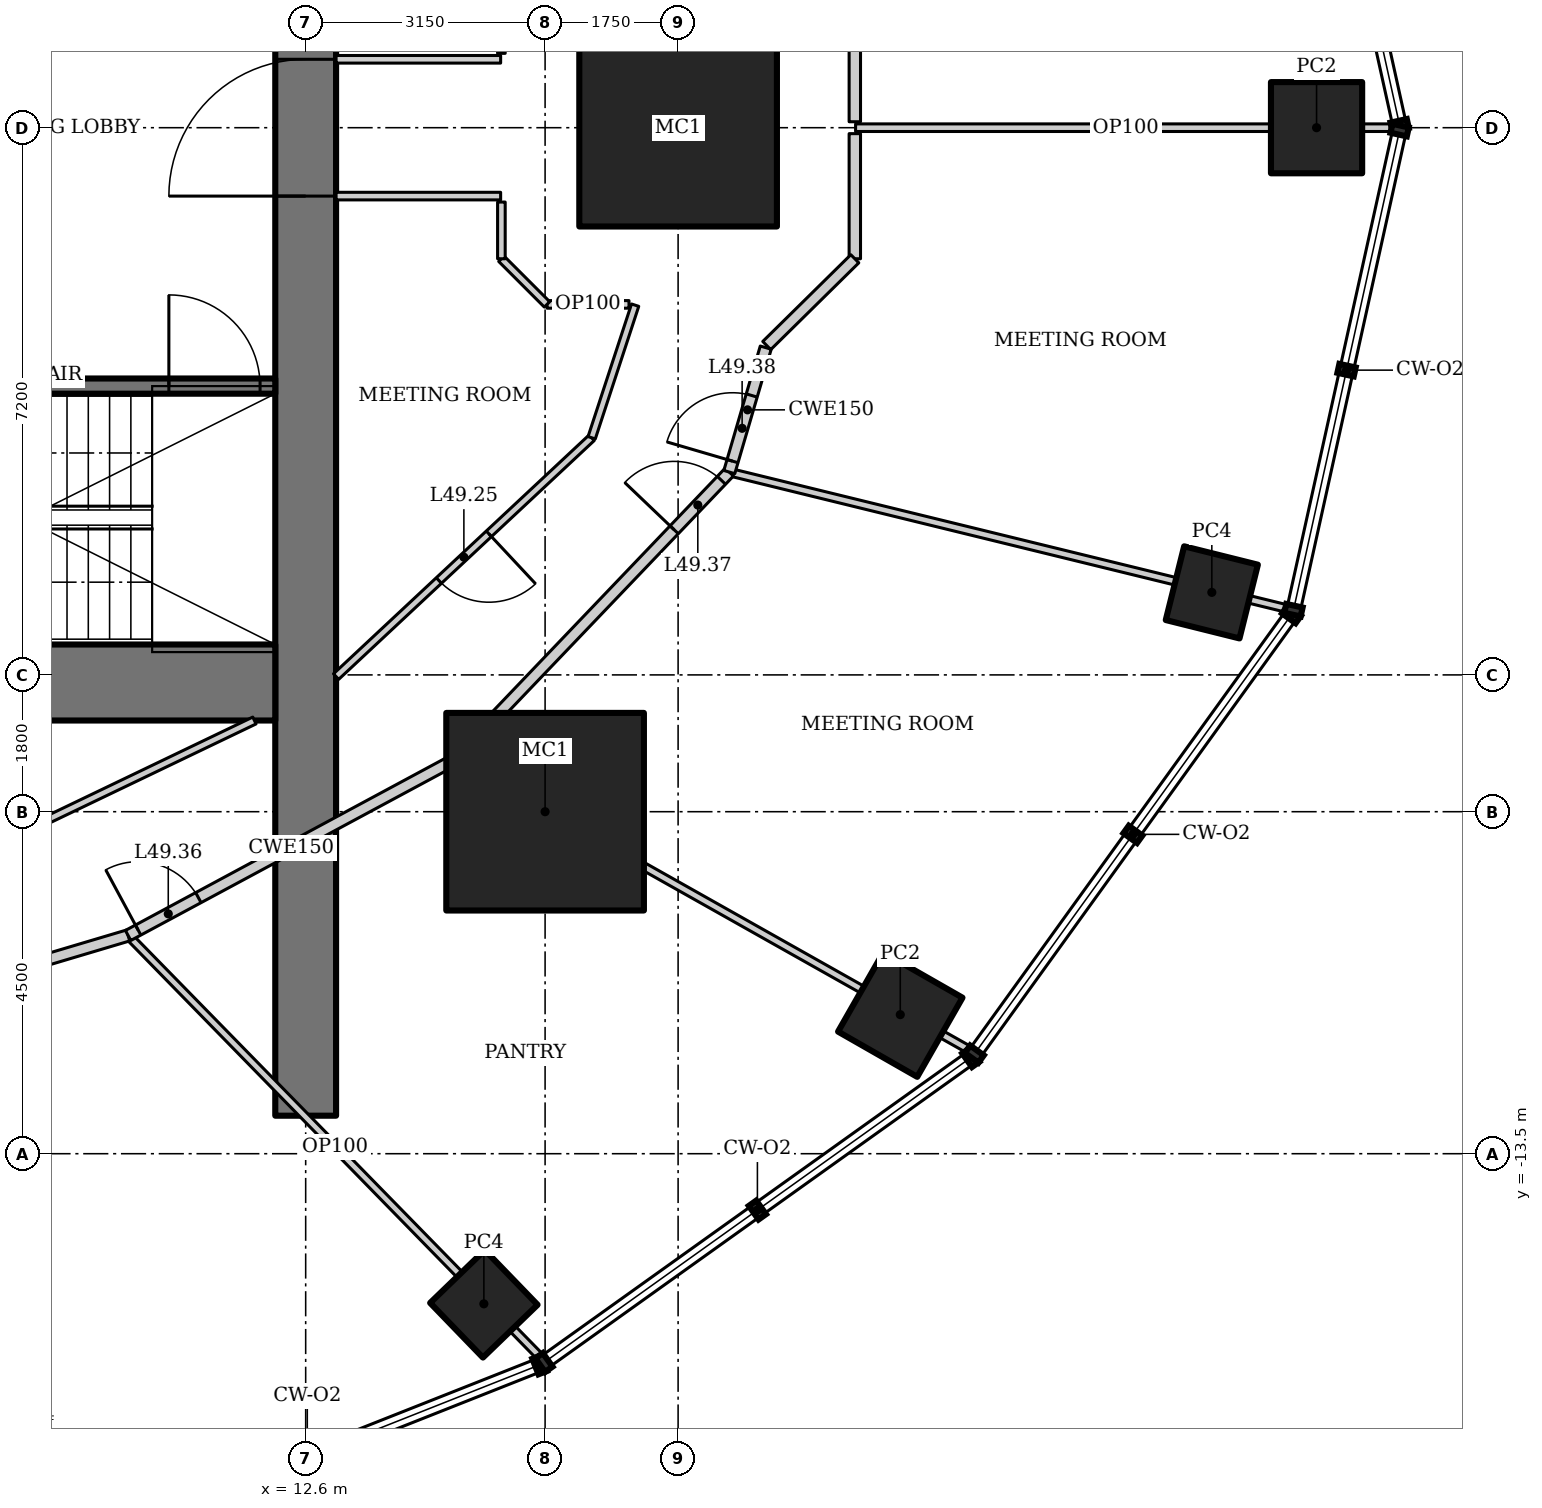
"""IFC4 building model, lengths in metres.
Left out: names, types, materials, properties, quantities, classifications, styles, units other than length and angle.
Written with IfcOpenShell. Run it as: python <this file> out.ifc"""

import sys

from ifc_helpers import new_model, si_unit, direction, frame, frame_2d, origin, origin_2d, place, context, subcontext, project, spatial, rectangle, hollow_rectangle, extrude, element, fill, save


model = new_model("IFC4")
c1 = context("Model", 3, precision=1e-05, world=origin(), true_north=direction((0.0, 1.0)))
c2 = subcontext(c1, "Body", "Model", "MODEL_VIEW")
j1 = project(units=[si_unit("LENGTHUNIT", "METRE"), si_unit("PLANEANGLEUNIT", "RADIAN")], contexts=[c1])
p1 = place(None, origin())
s1 = spatial("IfcSite", under=j1, at=p1, CompositionType="ELEMENT")
p2 = place(p1, origin())
s2 = spatial("IfcBuilding", under=s1, at=p2, CompositionType="ELEMENT")
p3 = place(p2, frame((0.0, 0.0, 211.6)))
s3 = spatial("IfcBuildingStorey", under=s2, at=p3, CompositionType="ELEMENT", Elevation=211.6)
for number, where, z_axis, x_axis in (
    (1, (17.5, 0.0, 0.0), (0.0, 0.0, 1.0), (1.0, 0.0, 0.0)),
    (2, (15.75, -9.0, 0.0), (0.0, 0.0, 1.0), (1.0, 0.0, 0.0)),
):
    element("IfcColumn", number, at=place(p3, frame(where, z_axis=z_axis, x_axis=x_axis)), inside=s3, PredefinedType="COLUMN", context=c2, shape_type="SweptSolid", body=[
        extrude(hollow_rectangle(XDim=2.6, YDim=2.6, WallThickness=0.13, at=origin_2d()), origin(), (0.0, 0.0, 1.0), 4.2),
    ])
p4 = place(p3, frame((25.9, 0.0, 0.0), z_axis=(0.0, 0.0, 1.0), x_axis=(1.0, 0.0, 0.0)))
e3 = element("IfcColumn", 3, at=p4, inside=s3, PredefinedType="COLUMN", context=c2, shape_type="SweptSolid", body=[
    extrude(hollow_rectangle(XDim=1.2, YDim=1.2, WallThickness=0.1, at=origin_2d()), origin(), (0.0, 0.0, 1.0), 4.2),
])
for number, where, z_axis, x_axis in (
    (4, (9.035, -17.731, 0.0), (0.0, 0.0, 1.0), (0.891, 0.454, 0.0)),
    (5, (14.944, -15.475, 0.0), (0.0, 0.0, 1.0), (0.719, 0.695, 0.0)),
):
    element("IfcColumn", number, at=place(p3, frame(where, z_axis=z_axis, x_axis=x_axis)), inside=s3, PredefinedType="COLUMN", context=c2, shape_type="SweptSolid", body=[
        extrude(hollow_rectangle(XDim=1.0, YDim=1.0, WallThickness=0.08, at=origin_2d()), origin(), (0.0, 0.0, 1.0), 4.2),
    ])
p5 = place(p3, frame((20.423, -11.67, 0.0), z_axis=(0.0, 0.0, 1.0), x_axis=(0.496139221777, 0.86824298017, 0.0)))
e6 = element("IfcColumn", 6, at=p5, inside=s3, PredefinedType="COLUMN", context=c2, shape_type="SweptSolid", body=[
    extrude(hollow_rectangle(XDim=1.2, YDim=1.2, WallThickness=0.1, at=origin_2d()), origin(), (0.0, 0.0, 1.0), 4.2),
])
p6 = place(p3, frame((24.522, -6.114, 0.0), z_axis=(0.0, 0.0, 1.0), x_axis=(0.2419218956, 0.970295726276, 0.0)))
e7 = element("IfcColumn", 7, at=p6, inside=s3, PredefinedType="COLUMN", context=c2, shape_type="SweptSolid", body=[
    extrude(hollow_rectangle(XDim=1.0, YDim=1.0, WallThickness=0.08, at=origin_2d()), origin(), (0.0, 0.0, 1.0), 4.2),
])
p7 = place(p3, frame((12.6, -13.0, 0.0), z_axis=(0.0, 0.0, 1.0), x_axis=(0.0, 1.0, 0.0)))
e8 = element("IfcWall", 8, at=p7, inside=s3, PredefinedType="SHEAR", context=c2, shape_type="SweptSolid", body=[
    extrude(rectangle(XDim=26.0, YDim=0.8, at=frame_2d((13.0, 0.0))), origin(), (0.0, 0.0, 1.0), 4.2),
])
p8 = place(p7, frame((12.1, 0.0, 0.0)))
e9 = element("IfcOpeningElement", 9, at=p8, cuts=e8, PredefinedType="OPENING", context=c2, shape_type="SweptSolid", body=[
    extrude(rectangle(XDim=1.8, YDim=2.1, at=frame_2d((0.9, 1.05))), frame((0.0, 0.41, 0.0), z_axis=(0.0, -1.0, 0.0), x_axis=(1.0, 0.0, 0.0)), (0.0, 0.0, 1.0), 0.82),
])
p9 = place(p3, frame((-12.2, -7.3, 0.0), z_axis=(0.0, 0.0, 1.0), x_axis=(1.0, 0.0, 0.0)))
e10 = element("IfcWall", 10, at=p9, inside=s3, PredefinedType="SHEAR", context=c2, shape_type="SweptSolid", body=[
    extrude(rectangle(XDim=24.4, YDim=1.0, at=frame_2d((12.2, 0.0))), origin(), (0.0, 0.0, 1.0), 4.2),
])
p10 = place(p3, frame((5.6, -3.4, 0.0), z_axis=(0.0, 0.0, 1.0), x_axis=(1.0, 0.0, 0.0)))
e11 = element("IfcWall", 11, at=p10, inside=s3, PredefinedType="SHEAR", context=c2, shape_type="SweptSolid", body=[
    extrude(rectangle(XDim=6.6, YDim=0.2, at=frame_2d((3.3, 0.0))), origin(), (0.0, 0.0, 1.0), 4.2),
])
p11 = place(p10, frame((5.2, 0.0, 0.0)))
e12 = element("IfcOpeningElement", 12, at=p11, cuts=e11, PredefinedType="OPENING", context=c2, shape_type="SweptSolid", body=[
    extrude(rectangle(XDim=1.2, YDim=2.1, at=frame_2d((0.6, 1.05))), frame((0.0, 0.11, 0.0), z_axis=(0.0, -1.0, 0.0), x_axis=(1.0, 0.0, 0.0)), (0.0, 0.0, 1.0), 0.22),
])
p12 = place(p3, frame((15.709, -16.199, 0.0), z_axis=(0.0, 0.0, 1.0), x_axis=(-0.699053895446, 0.715068983569, 0.0)))
e13 = element("IfcWall", 13, at=p12, inside=s3, PredefinedType="PARTITIONING", context=c2, shape_type="SweptSolid", body=[
    extrude(rectangle(XDim=7.79, YDim=0.1, at=frame_2d((3.895, 0.0))), origin(), (0.0, 0.0, 1.0), 3.41),
])
p13 = place(p3, frame((21.358, -12.15, 0.0), z_axis=(0.0, 0.0, 1.0), x_axis=(-0.871273053995, 0.490798599614, 0.0)))
e14 = element("IfcWall", 14, at=p13, inside=s3, PredefinedType="PARTITIONING", context=c2, shape_type="SweptSolid", body=[
    extrude(rectangle(XDim=7.807, YDim=0.1, at=frame_2d((3.904, 0.0))), origin(), (0.0, 0.0, 1.0), 3.521),
])
p14 = place(p3, frame((25.543, -6.336, 0.0), z_axis=(0.0, 0.0, 1.0), x_axis=(-0.97130474594, 0.237838370569, 0.0)))
e15 = element("IfcWall", 15, at=p14, inside=s3, PredefinedType="PARTITIONING", context=c2, shape_type="SweptSolid", body=[
    extrude(rectangle(XDim=7.587, YDim=0.1, at=frame_2d((3.793, 0.0))), origin(), (0.0, 0.0, 1.0), 3.108),
])
p15 = place(p3, frame((6.054, -11.882, 0.0), z_axis=(0.0, 0.0, 1.0), x_axis=(0.958384389306, 0.285480931648, 0.0)))
e16 = element("IfcWall", 16, at=p15, inside=s3, PredefinedType="PARTITIONING", context=c2, shape_type="SweptSolid", body=[
    extrude(rectangle(XDim=4.392, YDim=0.15, at=frame_2d((2.196, 0.0))), origin(), (0.0, 0.0, 1.0), 4.05),
])
p16 = place(p3, frame((10.264, -10.628, 0.0), z_axis=(0.0, 0.0, 1.0), x_axis=(0.88053863253, 0.47397438393, 0.0)))
e17 = element("IfcWall", 17, at=p16, inside=s3, PredefinedType="PARTITIONING", context=c2, shape_type="SweptSolid", body=[
    extrude(rectangle(XDim=4.875, YDim=0.15, at=frame_2d((2.438, 0.0))), origin(), (0.0, 0.0, 1.0), 4.05),
])
p17 = place(p16, frame((0.15, 0.0, 0.0)))
e18 = element("IfcOpeningElement", 18, at=p17, cuts=e17, PredefinedType="OPENING", context=c2, shape_type="SweptSolid", body=[
    extrude(rectangle(XDim=0.9, YDim=2.1, at=frame_2d((0.45, 1.05))), frame((0.0, 0.085, 0.0), z_axis=(0.0, -1.0, 0.0), x_axis=(1.0, 0.0, 0.0)), (0.0, 0.0, 1.0), 0.17),
])
p18 = place(p3, frame((14.556, -8.318, 0.0), z_axis=(0.0, 0.0, 1.0), x_axis=(0.690768413292, 0.723076067366, 0.0)))
e19 = element("IfcWall", 19, at=p18, inside=s3, PredefinedType="PARTITIONING", context=c2, shape_type="SweptSolid", body=[
    extrude(rectangle(XDim=5.237, YDim=0.15, at=frame_2d((2.618, 0.0))), origin(), (0.0, 0.0, 1.0), 4.05),
])
p19 = place(p18, frame((4.187, 0.0, 0.0)))
e20 = element("IfcOpeningElement", 20, at=p19, cuts=e19, PredefinedType="OPENING", context=c2, shape_type="SweptSolid", body=[
    extrude(rectangle(XDim=0.9, YDim=2.1, at=frame_2d((0.45, 1.05))), frame((0.0, 0.085, 0.0), z_axis=(0.0, -1.0, 0.0), x_axis=(1.0, 0.0, 0.0)), (0.0, 0.0, 1.0), 0.17),
])
p20 = place(p3, frame((11.926, -7.8, 0.0), z_axis=(0.0, 0.0, 1.0), x_axis=(-0.901553947207, -0.432666708073, 0.0)))
e21 = element("IfcWall", 21, at=p20, inside=s3, PredefinedType="PARTITIONING", context=c2, shape_type="SweptSolid", body=[
    extrude(rectangle(XDim=3.33, YDim=0.1, at=frame_2d((1.665, 0.0))), origin(), (0.0, 0.0, 1.0), 4.05),
])
p21 = place(p3, frame((16.363, -4.08, 0.0), z_axis=(0.0, 0.0, 1.0), x_axis=(-0.730651186567, -0.682750938167, 0.0)))
e22 = element("IfcWall", 22, at=p21, inside=s3, PredefinedType="PARTITIONING", context=c2, shape_type="SweptSolid", body=[
    extrude(rectangle(XDim=4.603, YDim=0.1, at=frame_2d((2.301, 0.0))), origin(), (0.0, 0.0, 1.0), 4.05),
])
p22 = place(p21, frame((1.851, 0.0, 0.0)))
e23 = element("IfcOpeningElement", 23, at=p22, cuts=e22, PredefinedType="OPENING", context=c2, shape_type="SweptSolid", body=[
    extrude(rectangle(XDim=0.9, YDim=2.1, at=frame_2d((0.45, 1.05))), frame((0.0, 0.06, 0.0), z_axis=(0.0, -1.0, 0.0), x_axis=(1.0, 0.0, 0.0)), (0.0, 0.0, 1.0), 0.12),
])
p23 = place(p3, frame((26.944, 0.0, 0.0), z_axis=(0.0, 0.0, 1.0), x_axis=(-1.0, 0.0, 0.0)))
e24 = element("IfcWall", 24, at=p23, inside=s3, PredefinedType="PARTITIONING", context=c2, shape_type="SweptSolid", body=[
    extrude(rectangle(XDim=7.109, YDim=0.1, at=frame_2d((3.555, 0.0))), origin(), (0.0, 0.0, 1.0), 3.349),
])
p24 = place(p3, frame((18.174, -4.531, 0.0), z_axis=(0.0, 0.0, 1.0), x_axis=(0.281027335084, 0.959699763955, 0.0)))
e25 = element("IfcWall", 25, at=p24, inside=s3, PredefinedType="PARTITIONING", context=c2, shape_type="SweptSolid", body=[
    extrude(rectangle(XDim=1.706, YDim=0.15, at=frame_2d((0.853, 0.0))), origin(), (0.0, 0.0, 1.0), 4.05),
])
p25 = place(p24, frame((0.15, 0.0, 0.0)))
e26 = element("IfcOpeningElement", 26, at=p25, cuts=e25, PredefinedType="OPENING", context=c2, shape_type="SweptSolid", body=[
    extrude(rectangle(XDim=0.9, YDim=2.1, at=frame_2d((0.45, 1.05))), frame((0.0, 0.085, 0.0), z_axis=(0.0, -1.0, 0.0), x_axis=(1.0, 0.0, 0.0)), (0.0, 0.0, 1.0), 0.17),
])
p26 = place(p3, frame((13.0, -0.9, 0.0), z_axis=(0.0, 0.0, 1.0), x_axis=(1.0, 0.0, 0.0)))
e27 = element("IfcWall", 27, at=p26, inside=s3, PredefinedType="PARTITIONING", context=c2, shape_type="SweptSolid", body=[
    extrude(rectangle(XDim=2.165, YDim=0.1, at=frame_2d((1.083, 0.0))), origin(), (0.0, 0.0, 1.0), 4.05),
])
p27 = place(p3, frame((16.935, -2.335, 0.0), z_axis=(0.0, 0.0, 1.0), x_axis=(-0.311517212063, -0.950240509865, 0.0)))
e28 = element("IfcWall", 28, at=p27, inside=s3, PredefinedType="PARTITIONING", context=c2, shape_type="SweptSolid", body=[
    extrude(rectangle(XDim=1.836, YDim=0.1, at=frame_2d((0.918, 0.0))), origin(), (0.0, 0.0, 1.0), 4.05),
])
p28 = place(p3, frame((15.165, 0.9, 0.0), z_axis=(0.0, 0.0, 1.0), x_axis=(-1.0, 0.0, 0.0)))
e29 = element("IfcWall", 29, at=p28, inside=s3, PredefinedType="PARTITIONING", context=c2, shape_type="SweptSolid", body=[
    extrude(rectangle(XDim=2.165, YDim=0.1, at=frame_2d((1.083, 0.0))), origin(), (0.0, 0.0, 1.0), 4.05),
])
p29 = place(p3, frame((16.854, -2.325, 0.0), z_axis=(0.0, 0.0, 1.0), x_axis=(-1.0, 0.0, 0.0)))
e30 = element("IfcWall", 30, at=p29, inside=s3, PredefinedType="PARTITIONING", context=c2, shape_type="SweptSolid", body=[
    extrude(rectangle(XDim=1.078, YDim=0.1, at=frame_2d((0.539, 0.0))), origin(), (0.0, 0.0, 1.0), 4.05),
])
p30 = place(p3, frame((15.775, -2.325, 0.0), z_axis=(0.0, 0.0, 1.0), x_axis=(-0.707106781187, 0.707106781187, 0.0)))
e31 = element("IfcWall", 31, at=p30, inside=s3, PredefinedType="PARTITIONING", context=c2, shape_type="SweptSolid", body=[
    extrude(rectangle(XDim=0.849, YDim=0.1, at=frame_2d((0.425, 0.0))), origin(), (0.0, 0.0, 1.0), 4.05),
])
for number, where, z_axis, x_axis in (
    (32, (15.175, -1.725, 0.0), (0.0, 0.0, 1.0), (0.0, 1.0, 0.0)),
    (33, (15.175, 0.978, 0.0), (0.0, 0.0, 1.0), (0.0, 1.0, 0.0)),
):
    element("IfcWall", number, at=place(p3, frame(where, z_axis=z_axis, x_axis=x_axis)), inside=s3, PredefinedType="PARTITIONING", context=c2, shape_type="SweptSolid", body=[
        extrude(rectangle(XDim=0.746, YDim=0.1, at=frame_2d((0.373, 0.0))), origin(), (0.0, 0.0, 1.0), 4.05),
    ])
for number, where, z_axis, x_axis in (
    (34, (19.825, 1.725, 0.0), (0.0, 0.0, 1.0), (0.0, -1.0, 0.0)),
    (35, (19.825, -0.078, 0.0), (0.0, 0.0, 1.0), (0.0, -1.0, 0.0)),
):
    element("IfcWall", number, at=place(p3, frame(where, z_axis=z_axis, x_axis=x_axis)), inside=s3, PredefinedType="PARTITIONING", context=c2, shape_type="SweptSolid", body=[
        extrude(rectangle(XDim=1.646, YDim=0.15, at=frame_2d((0.823, 0.0))), origin(), (0.0, 0.0, 1.0), 4.05),
    ])
p31 = place(p3, frame((19.825, -1.725, 0.0), z_axis=(0.0, 0.0, 1.0), x_axis=(-0.712265481509, -0.701910167935, 0.0)))
e36 = element("IfcWall", 36, at=p31, inside=s3, PredefinedType="PARTITIONING", context=c2, shape_type="SweptSolid", body=[
    extrude(rectangle(XDim=1.627, YDim=0.15, at=frame_2d((0.813, 0.0))), origin(), (0.0, 0.0, 1.0), 4.05),
])
p32 = place(p11, origin())
e37 = element("IfcDoor", 37, at=p32, inside=s3, OperationType="SINGLE_SWING_RIGHT", PredefinedType="DOOR", context=c2, shape_type="SweptSolid", body=[
    extrude(rectangle(XDim=1.2, YDim=2.1, at=frame_2d((0.6, 1.05))), frame((0.0, 0.025, 0.0), z_axis=(0.0, -1.0, 0.0), x_axis=(1.0, 0.0, 0.0)), (0.0, 0.0, 1.0), 0.05),
])
fill(e12, e37)
p33 = place(p8, origin())
e38 = element("IfcDoor", 38, at=p33, inside=s3, OperationType="DOUBLE_DOOR_DOUBLE_SWING", PredefinedType="DOOR", context=c2, shape_type="SweptSolid", body=[
    extrude(rectangle(XDim=1.8, YDim=2.1, at=frame_2d((0.9, 1.05))), frame((0.0, 0.025, 0.0), z_axis=(0.0, -1.0, 0.0), x_axis=(1.0, 0.0, 0.0)), (0.0, 0.0, 1.0), 0.05),
])
fill(e9, e38)
p34 = place(p22, origin())
e39 = element("IfcDoor", 39, at=p34, inside=s3, OperationType="SINGLE_SWING_LEFT", PredefinedType="DOOR", context=c2, shape_type="SweptSolid", body=[
    extrude(rectangle(XDim=0.9, YDim=2.1, at=frame_2d((0.45, 1.05))), frame((0.0, 0.025, 0.0), z_axis=(0.0, -1.0, 0.0), x_axis=(1.0, 0.0, 0.0)), (0.0, 0.0, 1.0), 0.05),
])
fill(e23, e39)
p35 = place(p17, origin())
e40 = element("IfcDoor", 40, at=p35, inside=s3, OperationType="SINGLE_SWING_LEFT", PredefinedType="DOOR", context=c2, shape_type="SweptSolid", body=[
    extrude(rectangle(XDim=0.9, YDim=2.1, at=frame_2d((0.45, 1.05))), frame((0.0, 0.025, 0.0), z_axis=(0.0, -1.0, 0.0), x_axis=(1.0, 0.0, 0.0)), (0.0, 0.0, 1.0), 0.05),
])
fill(e18, e40)
p36 = place(p19, origin())
e41 = element("IfcDoor", 41, at=p36, inside=s3, OperationType="SINGLE_SWING_LEFT", PredefinedType="DOOR", context=c2, shape_type="SweptSolid", body=[
    extrude(rectangle(XDim=0.9, YDim=2.1, at=frame_2d((0.45, 1.05))), frame((0.0, 0.025, 0.0), z_axis=(0.0, -1.0, 0.0), x_axis=(1.0, 0.0, 0.0)), (0.0, 0.0, 1.0), 0.05),
])
fill(e20, e41)
p37 = place(p25, origin())
e42 = element("IfcDoor", 42, at=p37, inside=s3, OperationType="SINGLE_SWING_LEFT", PredefinedType="DOOR", context=c2, shape_type="SweptSolid", body=[
    extrude(rectangle(XDim=0.9, YDim=2.1, at=frame_2d((0.45, 1.05))), frame((0.0, 0.025, 0.0), z_axis=(0.0, -1.0, 0.0), x_axis=(1.0, 0.0, 0.0)), (0.0, 0.0, 1.0), 0.05),
])
fill(e26, e42)
save(model, sys.argv[1])
